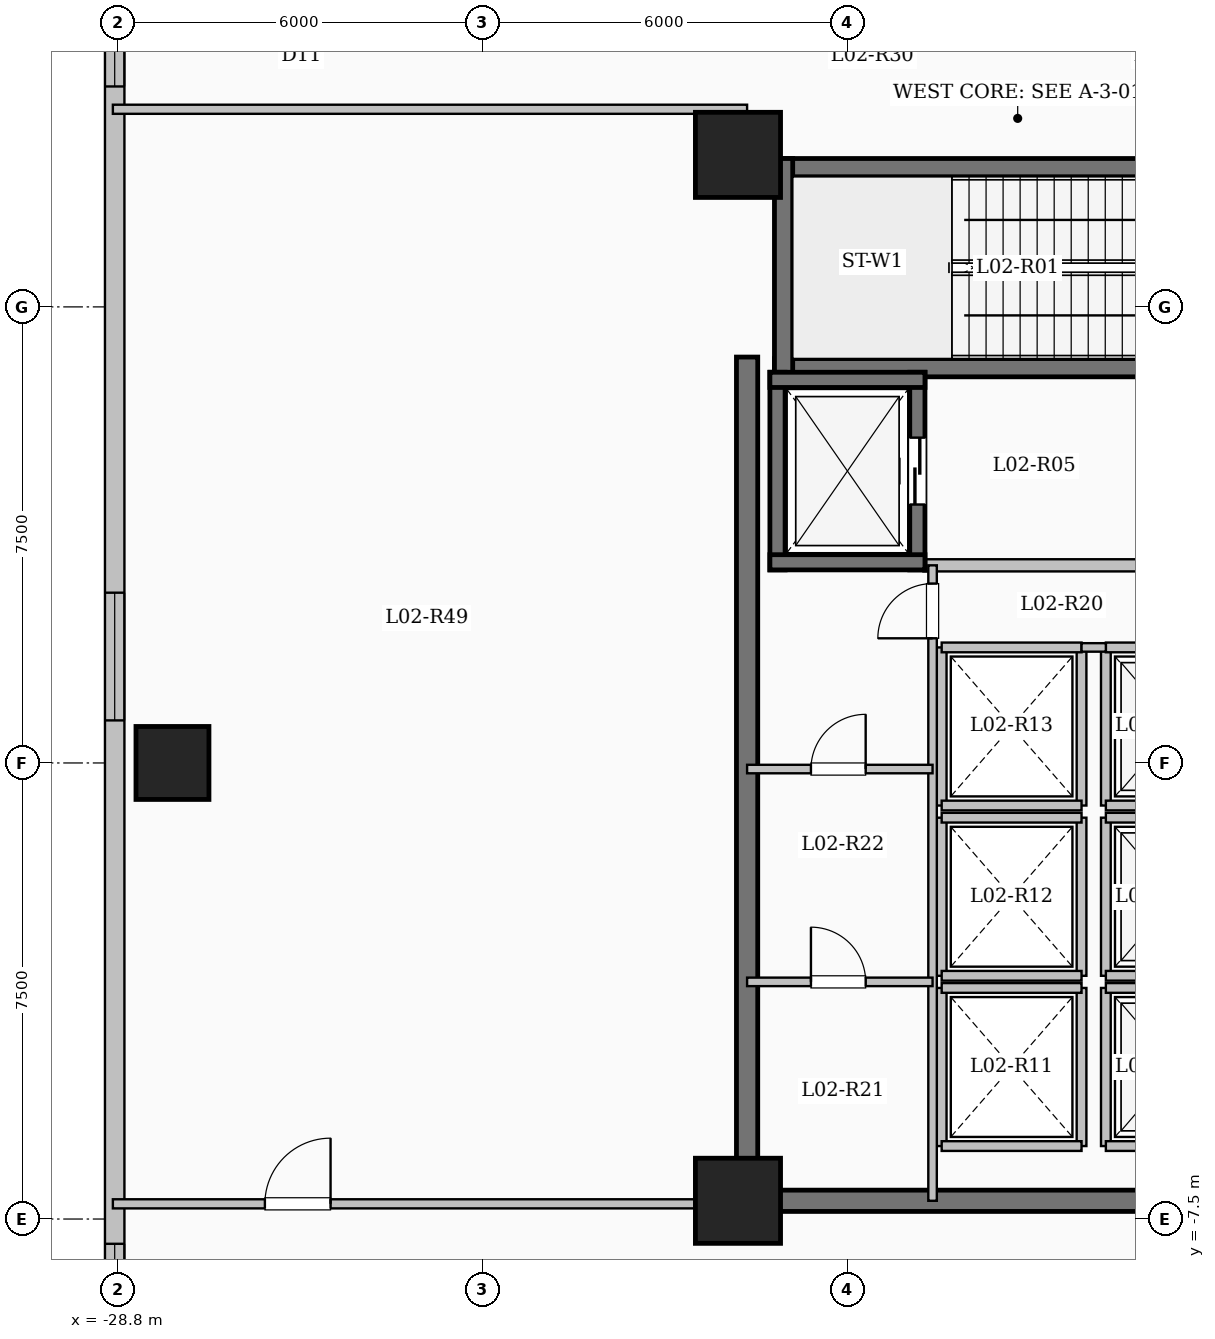
"""IFC4 building model, lengths in metres.
Left out: names, types, materials, properties, quantities, classifications, styles, units other than length and angle.
Written with IfcOpenShell. Run it as: python <this file> out.ifc"""

import sys

from ifc_helpers import new_model, si_unit, direction, frame, frame_2d, origin, origin_2d, place, context, subcontext, project, spatial, rectangle, extrude, element, fill, save


model = new_model("IFC4")
c1 = context("Model", 3, precision=1e-05, world=origin(), true_north=direction((0.0, 1.0)))
c2 = subcontext(c1, "Body", "Model", "MODEL_VIEW")
j1 = project(units=[si_unit("LENGTHUNIT", "METRE"), si_unit("PLANEANGLEUNIT", "RADIAN")], contexts=[c1])
p1 = place(None, origin())
s1 = spatial("IfcSite", under=j1, at=p1, CompositionType="ELEMENT")
p2 = place(p1, origin())
s2 = spatial("IfcBuilding", under=s1, at=p2, CompositionType="ELEMENT")
p3 = place(p2, frame((0.0, 0.0, 9.9)))
s3 = spatial("IfcBuildingStorey", under=s2, at=p3, CompositionType="ELEMENT", Elevation=9.9)
for number, where, z_axis, x_axis in (
    (1, (-18.6, -7.2, 0.0), (0.0, 0.0, 1.0), (1.0, 0.0, 0.0)),
    (2, (-18.6, 10.0, 0.0), (0.0, 0.0, 1.0), (1.0, 0.0, 0.0)),
):
    element("IfcColumn", number, at=place(p3, frame(where, z_axis=z_axis, x_axis=x_axis)), inside=s3, PredefinedType="COLUMN", context=c2, shape_type="SweptSolid", body=[
        extrude(rectangle(XDim=1.4, YDim=1.4, at=origin_2d()), origin(), (0.0, 0.0, 1.0), 4.5),
    ])
p4 = place(p3, frame((-27.9, 0.0, 0.0), z_axis=(0.0, 0.0, 1.0), x_axis=(1.0, 0.0, 0.0)))
e3 = element("IfcColumn", 3, at=p4, inside=s3, PredefinedType="COLUMN", context=c2, shape_type="SweptSolid", body=[
    extrude(rectangle(XDim=1.2, YDim=1.2, at=origin_2d()), origin(), (0.0, 0.0, 1.0), 4.5),
])
p5 = place(p3, frame((-28.85, -29.85, 0.0), z_axis=(0.0, 0.0, 1.0), x_axis=(0.0, 1.0, 0.0)))
e4 = element("IfcWall", 4, at=p5, inside=s3, PredefinedType="SOLIDWALL", context=c2, shape_type="SweptSolid", body=[
    extrude(rectangle(XDim=59.7, YDim=0.32, at=frame_2d((29.85, 0.0))), origin(), (0.0, 0.0, 1.0), 4.2),
])
p6 = place(p5, frame((8.65, 0.0, 0.9)))
e5 = element("IfcOpeningElement", 5, at=p6, cuts=e4, PredefinedType="OPENING", context=c2, shape_type="SweptSolid", body=[
    extrude(rectangle(XDim=2.1, YDim=2.0, at=frame_2d((1.05, 1.0))), frame((0.0, 0.17, 0.0), z_axis=(0.0, -1.0, 0.0), x_axis=(1.0, 0.0, 0.0)), (0.0, 0.0, 1.0), 0.34),
])
p7 = place(p5, frame((20.242, 0.0, 0.9)))
e6 = element("IfcOpeningElement", 6, at=p7, cuts=e4, PredefinedType="OPENING", context=c2, shape_type="SweptSolid", body=[
    extrude(rectangle(XDim=1.7, YDim=1.9, at=frame_2d((0.85, 0.95))), frame((0.0, 0.17, 0.0), z_axis=(0.0, -1.0, 0.0), x_axis=(1.0, 0.0, 0.0)), (0.0, 0.0, 1.0), 0.34),
])
p8 = place(p5, frame((30.55, 0.0, 0.9)))
e7 = element("IfcOpeningElement", 7, at=p8, cuts=e4, PredefinedType="OPENING", context=c2, shape_type="SweptSolid", body=[
    extrude(rectangle(XDim=2.1, YDim=2.0, at=frame_2d((1.05, 1.0))), frame((0.0, 0.17, 0.0), z_axis=(0.0, -1.0, 0.0), x_axis=(1.0, 0.0, 0.0)), (0.0, 0.0, 1.0), 0.34),
])
p9 = place(p5, frame((40.975, 0.0, 0.95)))
e8 = element("IfcOpeningElement", 8, at=p9, cuts=e4, PredefinedType="OPENING", context=c2, shape_type="SweptSolid", body=[
    extrude(rectangle(XDim=1.0, YDim=1.5, at=frame_2d((0.5, 0.75))), frame((0.0, 0.17, 0.0), z_axis=(0.0, -1.0, 0.0), x_axis=(1.0, 0.0, 0.0)), (0.0, 0.0, 1.0), 0.34),
])
p10 = place(p5, frame((50.0, 0.0, 0.9)))
e9 = element("IfcOpeningElement", 9, at=p10, cuts=e4, PredefinedType="OPENING", context=c2, shape_type="SweptSolid", body=[
    extrude(rectangle(XDim=2.1, YDim=2.0, at=frame_2d((1.05, 1.0))), frame((0.0, 0.17, 0.0), z_axis=(0.0, -1.0, 0.0), x_axis=(1.0, 0.0, 0.0)), (0.0, 0.0, 1.0), 0.34),
])
p11 = place(p3, frame((-18.0, 9.79, 0.0), z_axis=(0.0, 0.0, 1.0), x_axis=(1.0, 0.0, 0.0)))
e10 = element("IfcWall", 10, at=p11, inside=s3, PredefinedType="SHEAR", context=c2, shape_type="SweptSolid", body=[
    extrude(rectangle(XDim=8.0, YDim=0.3, at=frame_2d((4.0, 0.0))), origin(), (0.0, 0.0, 1.0), 4.5),
])
p12 = place(p3, frame((-18.0, 6.5, 0.0), z_axis=(0.0, 0.0, 1.0), x_axis=(1.0, 0.0, 0.0)))
e11 = element("IfcWall", 11, at=p12, inside=s3, PredefinedType="SHEAR", context=c2, shape_type="SweptSolid", body=[
    extrude(rectangle(XDim=8.0, YDim=0.3, at=frame_2d((4.0, 0.0))), origin(), (0.0, 0.0, 1.0), 4.5),
])
p13 = place(p12, frame((6.45, 0.0, 0.0)))
e12 = element("IfcOpeningElement", 12, at=p13, cuts=e11, PredefinedType="OPENING", context=c2, shape_type="SweptSolid", body=[
    extrude(rectangle(XDim=1.0, YDim=2.15, at=frame_2d((0.5, 1.075))), frame((0.0, 0.16, 0.0), z_axis=(0.0, -1.0, 0.0), x_axis=(1.0, 0.0, 0.0)), (0.0, 0.0, 1.0), 0.32),
])
p14 = place(p3, frame((-17.85, 6.35, 0.0), z_axis=(0.0, 0.0, 1.0), x_axis=(0.0, 1.0, 0.0)))
e13 = element("IfcWall", 13, at=p14, inside=s3, PredefinedType="SHEAR", context=c2, shape_type="SweptSolid", body=[
    extrude(rectangle(XDim=3.59, YDim=0.3, at=frame_2d((1.795, 0.0))), origin(), (0.0, 0.0, 1.0), 4.5),
])
p15 = place(p3, frame((-15.55, 3.25, 0.0), z_axis=(0.0, 0.0, 1.0), x_axis=(1.0, 0.0, 0.0)))
e14 = element("IfcWall", 14, at=p15, inside=s3, PredefinedType="SOLIDWALL", context=c2, shape_type="SweptSolid", body=[
    extrude(rectangle(XDim=5.4, YDim=0.2, at=frame_2d((2.7, 0.0))), origin(), (0.0, 0.0, 1.0), 4.2),
])
p16 = place(p3, frame((-17.95, 3.175, 0.0), z_axis=(0.0, 0.0, 1.0), x_axis=(0.0, 1.0, 0.0)))
e15 = element("IfcWall", 15, at=p16, inside=s3, PredefinedType="SHEAR", context=c2, shape_type="SweptSolid", body=[
    extrude(rectangle(XDim=3.25, YDim=0.25, at=frame_2d((1.625, 0.0))), origin(), (0.0, 0.0, 1.0), 4.5),
])
p17 = place(p3, frame((-15.65, 3.175, 0.0), z_axis=(0.0, 0.0, 1.0), x_axis=(0.0, 1.0, 0.0)))
e16 = element("IfcWall", 16, at=p17, inside=s3, PredefinedType="SHEAR", context=c2, shape_type="SweptSolid", body=[
    extrude(rectangle(XDim=3.25, YDim=0.25, at=frame_2d((1.625, 0.0))), origin(), (0.0, 0.0, 1.0), 4.5),
])
p18 = place(p17, frame((1.075, 0.0, 0.0)))
e17 = element("IfcOpeningElement", 17, at=p18, cuts=e16, PredefinedType="OPENING", context=c2, shape_type="SweptSolid", body=[
    extrude(rectangle(XDim=1.1, YDim=2.15, at=frame_2d((0.55, 1.075))), frame((0.0, 0.135, 0.0), z_axis=(0.0, -1.0, 0.0), x_axis=(1.0, 0.0, 0.0)), (0.0, 0.0, 1.0), 0.27),
])
for number, where, z_axis, x_axis in (
    (18, (-18.075, 3.3, 0.0), (0.0, 0.0, 1.0), (1.0, 0.0, 0.0)),
    (19, (-18.075, 6.3, 0.0), (0.0, 0.0, 1.0), (1.0, 0.0, 0.0)),
):
    element("IfcWall", number, at=place(p3, frame(where, z_axis=z_axis, x_axis=x_axis)), inside=s3, PredefinedType="SHEAR", context=c2, shape_type="SweptSolid", body=[
        extrude(rectangle(XDim=2.55, YDim=0.25, at=frame_2d((1.275, 0.0))), origin(), (0.0, 0.0, 1.0), 4.5),
    ])
p19 = place(p3, frame((-12.55, -6.3, 0.0), z_axis=(0.0, 0.0, 1.0), x_axis=(0.0, 1.0, 0.0)))
e20 = element("IfcWall", 20, at=p19, inside=s3, PredefinedType="SOLIDWALL", context=c2, shape_type="SweptSolid", body=[
    extrude(rectangle(XDim=2.6, YDim=0.16, at=frame_2d((1.3, 0.0))), origin(), (0.0, 0.0, 1.0), 4.2),
])
for number, where, z_axis, x_axis in (
    (21, (-12.55, -6.3, 0.0), (0.0, 0.0, 1.0), (1.0, 0.0, 0.0)),
    (22, (-12.55, -3.7, 0.0), (0.0, 0.0, 1.0), (1.0, 0.0, 0.0)),
):
    element("IfcWall", number, at=place(p3, frame(where, z_axis=z_axis, x_axis=x_axis)), inside=s3, PredefinedType="SOLIDWALL", context=c2, shape_type="SweptSolid", body=[
        extrude(rectangle(XDim=2.3, YDim=0.16, at=frame_2d((1.15, 0.0))), origin(), (0.0, 0.0, 1.0), 4.2),
    ])
p20 = place(p3, frame((-12.55, -3.5, 0.0), z_axis=(0.0, 0.0, 1.0), x_axis=(0.0, 1.0, 0.0)))
e23 = element("IfcWall", 23, at=p20, inside=s3, PredefinedType="SOLIDWALL", context=c2, shape_type="SweptSolid", body=[
    extrude(rectangle(XDim=2.6, YDim=0.16, at=frame_2d((1.3, 0.0))), origin(), (0.0, 0.0, 1.0), 4.2),
])
for number, where, z_axis, x_axis in (
    (24, (-12.55, -3.5, 0.0), (0.0, 0.0, 1.0), (1.0, 0.0, 0.0)),
    (25, (-12.55, -0.9, 0.0), (0.0, 0.0, 1.0), (1.0, 0.0, 0.0)),
):
    element("IfcWall", number, at=place(p3, frame(where, z_axis=z_axis, x_axis=x_axis)), inside=s3, PredefinedType="SOLIDWALL", context=c2, shape_type="SweptSolid", body=[
        extrude(rectangle(XDim=2.3, YDim=0.16, at=frame_2d((1.15, 0.0))), origin(), (0.0, 0.0, 1.0), 4.2),
    ])
p21 = place(p3, frame((-12.55, -0.7, 0.0), z_axis=(0.0, 0.0, 1.0), x_axis=(0.0, 1.0, 0.0)))
e26 = element("IfcWall", 26, at=p21, inside=s3, PredefinedType="SOLIDWALL", context=c2, shape_type="SweptSolid", body=[
    extrude(rectangle(XDim=2.6, YDim=0.16, at=frame_2d((1.3, 0.0))), origin(), (0.0, 0.0, 1.0), 4.2),
])
for number, where, z_axis, x_axis in (
    (27, (-12.55, -0.7, 0.0), (0.0, 0.0, 1.0), (1.0, 0.0, 0.0)),
    (28, (-12.55, 1.9, 0.0), (0.0, 0.0, 1.0), (1.0, 0.0, 0.0)),
):
    element("IfcWall", number, at=place(p3, frame(where, z_axis=z_axis, x_axis=x_axis)), inside=s3, PredefinedType="SOLIDWALL", context=c2, shape_type="SweptSolid", body=[
        extrude(rectangle(XDim=2.3, YDim=0.16, at=frame_2d((1.15, 0.0))), origin(), (0.0, 0.0, 1.0), 4.2),
    ])
for number, where, z_axis, x_axis in (
    (29, (-15.25, -6.3, 0.0), (0.0, 0.0, 1.0), (0.0, 1.0, 0.0)),
    (30, (-12.95, -6.3, 0.0), (0.0, 0.0, 1.0), (0.0, 1.0, 0.0)),
):
    element("IfcWall", number, at=place(p3, frame(where, z_axis=z_axis, x_axis=x_axis)), inside=s3, PredefinedType="SOLIDWALL", context=c2, shape_type="SweptSolid", body=[
        extrude(rectangle(XDim=2.6, YDim=0.16, at=frame_2d((1.3, 0.0))), origin(), (0.0, 0.0, 1.0), 4.2),
    ])
for number, where, z_axis, x_axis in (
    (31, (-15.25, -6.3, 0.0), (0.0, 0.0, 1.0), (1.0, 0.0, 0.0)),
    (32, (-15.25, -3.7, 0.0), (0.0, 0.0, 1.0), (1.0, 0.0, 0.0)),
):
    element("IfcWall", number, at=place(p3, frame(where, z_axis=z_axis, x_axis=x_axis)), inside=s3, PredefinedType="SOLIDWALL", context=c2, shape_type="SweptSolid", body=[
        extrude(rectangle(XDim=2.3, YDim=0.16, at=frame_2d((1.15, 0.0))), origin(), (0.0, 0.0, 1.0), 4.2),
    ])
for number, where, z_axis, x_axis in (
    (33, (-15.25, -3.5, 0.0), (0.0, 0.0, 1.0), (0.0, 1.0, 0.0)),
    (34, (-12.95, -3.5, 0.0), (0.0, 0.0, 1.0), (0.0, 1.0, 0.0)),
):
    element("IfcWall", number, at=place(p3, frame(where, z_axis=z_axis, x_axis=x_axis)), inside=s3, PredefinedType="SOLIDWALL", context=c2, shape_type="SweptSolid", body=[
        extrude(rectangle(XDim=2.6, YDim=0.16, at=frame_2d((1.3, 0.0))), origin(), (0.0, 0.0, 1.0), 4.2),
    ])
for number, where, z_axis, x_axis in (
    (35, (-15.25, -3.5, 0.0), (0.0, 0.0, 1.0), (1.0, 0.0, 0.0)),
    (36, (-15.25, -0.9, 0.0), (0.0, 0.0, 1.0), (1.0, 0.0, 0.0)),
):
    element("IfcWall", number, at=place(p3, frame(where, z_axis=z_axis, x_axis=x_axis)), inside=s3, PredefinedType="SOLIDWALL", context=c2, shape_type="SweptSolid", body=[
        extrude(rectangle(XDim=2.3, YDim=0.16, at=frame_2d((1.15, 0.0))), origin(), (0.0, 0.0, 1.0), 4.2),
    ])
for number, where, z_axis, x_axis in (
    (37, (-15.25, -0.7, 0.0), (0.0, 0.0, 1.0), (0.0, 1.0, 0.0)),
    (38, (-12.95, -0.7, 0.0), (0.0, 0.0, 1.0), (0.0, 1.0, 0.0)),
):
    element("IfcWall", number, at=place(p3, frame(where, z_axis=z_axis, x_axis=x_axis)), inside=s3, PredefinedType="SOLIDWALL", context=c2, shape_type="SweptSolid", body=[
        extrude(rectangle(XDim=2.6, YDim=0.16, at=frame_2d((1.3, 0.0))), origin(), (0.0, 0.0, 1.0), 4.2),
    ])
for number, where, z_axis, x_axis in (
    (39, (-15.25, -0.7, 0.0), (0.0, 0.0, 1.0), (1.0, 0.0, 0.0)),
    (40, (-15.25, 1.9, 0.0), (0.0, 0.0, 1.0), (1.0, 0.0, 0.0)),
):
    element("IfcWall", number, at=place(p3, frame(where, z_axis=z_axis, x_axis=x_axis)), inside=s3, PredefinedType="SOLIDWALL", context=c2, shape_type="SweptSolid", body=[
        extrude(rectangle(XDim=2.3, YDim=0.16, at=frame_2d((1.15, 0.0))), origin(), (0.0, 0.0, 1.0), 4.2),
    ])
p22 = place(p3, frame((-18.45, -7.375, 0.0), z_axis=(0.0, 0.0, 1.0), x_axis=(0.0, 1.0, 0.0)))
e41 = element("IfcWall", 41, at=p22, inside=s3, PredefinedType="SHEAR", context=c2, shape_type="SweptSolid", body=[
    extrude(rectangle(XDim=14.05, YDim=0.35, at=frame_2d((7.025, 0.0))), origin(), (0.0, 0.0, 1.0), 4.5),
])
p23 = place(p3, frame((-18.625, -7.2, 0.0), z_axis=(0.0, 0.0, 1.0), x_axis=(1.0, 0.0, 0.0)))
e42 = element("IfcWall", 42, at=p23, inside=s3, PredefinedType="SHEAR", context=c2, shape_type="SweptSolid", body=[
    extrude(rectangle(XDim=8.55, YDim=0.35, at=frame_2d((4.275, 0.0))), origin(), (0.0, 0.0, 1.0), 4.5),
])
p24 = place(p3, frame((-12.95, 1.9, 0.0), z_axis=(0.0, 0.0, 1.0), x_axis=(1.0, 0.0, 0.0)))
e43 = element("IfcWall", 43, at=p24, inside=s3, PredefinedType="PARTITIONING", context=c2, shape_type="SweptSolid", body=[
    extrude(rectangle(XDim=0.4, YDim=0.14, at=frame_2d((0.2, 0.0))), origin(), (0.0, 0.0, 1.0), 4.2),
])
p25 = place(p3, frame((-15.4, -7.2, 0.0), z_axis=(0.0, 0.0, 1.0), x_axis=(0.0, 1.0, 0.0)))
e44 = element("IfcWall", 44, at=p25, inside=s3, PredefinedType="PARTITIONING", context=c2, shape_type="SweptSolid", body=[
    extrude(rectangle(XDim=10.45, YDim=0.14, at=frame_2d((5.225, 0.0))), origin(), (0.0, 0.0, 1.0), 4.2),
])
p26 = place(p25, frame((9.25, 0.0, 0.0)))
e45 = element("IfcOpeningElement", 45, at=p26, cuts=e44, PredefinedType="OPENING", context=c2, shape_type="SweptSolid", body=[
    extrude(rectangle(XDim=0.9, YDim=2.08, at=frame_2d((0.45, 1.04))), frame((0.0, 0.08, 0.0), z_axis=(0.0, -1.0, 0.0), x_axis=(1.0, 0.0, 0.0)), (0.0, 0.0, 1.0), 0.16),
])
p27 = place(p3, frame((-18.45, -3.6, 0.0), z_axis=(0.0, 0.0, 1.0), x_axis=(1.0, 0.0, 0.0)))
e46 = element("IfcWall", 46, at=p27, inside=s3, PredefinedType="PARTITIONING", context=c2, shape_type="SweptSolid", body=[
    extrude(rectangle(XDim=3.05, YDim=0.14, at=frame_2d((1.525, 0.0))), origin(), (0.0, 0.0, 1.0), 4.2),
])
p28 = place(p27, frame((1.05, 0.0, 0.0)))
e47 = element("IfcOpeningElement", 47, at=p28, cuts=e46, PredefinedType="OPENING", context=c2, shape_type="SweptSolid", body=[
    extrude(rectangle(XDim=0.9, YDim=2.08, at=frame_2d((0.45, 1.04))), frame((0.0, 0.08, 0.0), z_axis=(0.0, -1.0, 0.0), x_axis=(1.0, 0.0, 0.0)), (0.0, 0.0, 1.0), 0.16),
])
p29 = place(p3, frame((-18.45, -0.1, 0.0), z_axis=(0.0, 0.0, 1.0), x_axis=(1.0, 0.0, 0.0)))
e48 = element("IfcWall", 48, at=p29, inside=s3, PredefinedType="PARTITIONING", context=c2, shape_type="SweptSolid", body=[
    extrude(rectangle(XDim=3.05, YDim=0.14, at=frame_2d((1.525, 0.0))), origin(), (0.0, 0.0, 1.0), 4.2),
])
p30 = place(p29, frame((1.05, 0.0, 0.0)))
e49 = element("IfcOpeningElement", 49, at=p30, cuts=e48, PredefinedType="OPENING", context=c2, shape_type="SweptSolid", body=[
    extrude(rectangle(XDim=0.9, YDim=2.08, at=frame_2d((0.45, 1.04))), frame((0.0, 0.08, 0.0), z_axis=(0.0, -1.0, 0.0), x_axis=(1.0, 0.0, 0.0)), (0.0, 0.0, 1.0), 0.16),
])
p31 = place(p3, frame((-28.88, -7.25, 0.0), z_axis=(0.0, 0.0, 1.0), x_axis=(1.0, 0.0, 0.0)))
e50 = element("IfcWall", 50, at=p31, inside=s3, PredefinedType="PARTITIONING", context=c2, shape_type="SweptSolid", body=[
    extrude(rectangle(XDim=10.43, YDim=0.15, at=frame_2d((5.215, 0.0))), origin(), (0.0, 0.0, 1.0), 4.2),
])
p32 = place(p31, frame((2.5, 0.0, 0.0)))
e51 = element("IfcOpeningElement", 51, at=p32, cuts=e50, PredefinedType="OPENING", context=c2, shape_type="SweptSolid", body=[
    extrude(rectangle(XDim=1.08, YDim=2.15, at=frame_2d((0.54, 1.075))), frame((0.0, 0.085, 0.0), z_axis=(0.0, -1.0, 0.0), x_axis=(1.0, 0.0, 0.0)), (0.0, 0.0, 1.0), 0.17),
])
p33 = place(p3, frame((-28.88, 10.75, 0.0), z_axis=(0.0, 0.0, 1.0), x_axis=(1.0, 0.0, 0.0)))
e52 = element("IfcWall", 52, at=p33, inside=s3, PredefinedType="PARTITIONING", context=c2, shape_type="SweptSolid", body=[
    extrude(rectangle(XDim=10.43, YDim=0.15, at=frame_2d((5.215, 0.0))), origin(), (0.0, 0.0, 1.0), 4.2),
])
p34 = place(p7, origin())
e53 = element("IfcWindow", 53, at=p34, inside=s3, PartitioningType="SINGLE_PANEL", PredefinedType="WINDOW", context=c2, shape_type="SweptSolid", body=[
    extrude(rectangle(XDim=1.7, YDim=1.9, at=frame_2d((0.85, 0.95))), frame((0.0, 0.03, 0.0), z_axis=(0.0, -1.0, 0.0), x_axis=(1.0, 0.0, 0.0)), (0.0, 0.0, 1.0), 0.06),
])
fill(e6, e53)
p35 = place(p8, origin())
e54 = element("IfcWindow", 54, at=p35, inside=s3, PartitioningType="SINGLE_PANEL", PredefinedType="WINDOW", context=c2, shape_type="SweptSolid", body=[
    extrude(rectangle(XDim=2.1, YDim=2.0, at=frame_2d((1.05, 1.0))), frame((0.0, 0.03, 0.0), z_axis=(0.0, -1.0, 0.0), x_axis=(1.0, 0.0, 0.0)), (0.0, 0.0, 1.0), 0.06),
])
fill(e7, e54)
p36 = place(p9, origin())
e55 = element("IfcWindow", 55, at=p36, inside=s3, PartitioningType="SINGLE_PANEL", PredefinedType="WINDOW", context=c2, shape_type="SweptSolid", body=[
    extrude(rectangle(XDim=1.0, YDim=1.5, at=frame_2d((0.5, 0.75))), frame((0.0, 0.03, 0.0), z_axis=(0.0, -1.0, 0.0), x_axis=(1.0, 0.0, 0.0)), (0.0, 0.0, 1.0), 0.06),
])
fill(e8, e55)
p37 = place(p18, origin())
e56 = element("IfcDoor", 56, at=p37, inside=s3, OperationType="SLIDING_TO_LEFT", PredefinedType="DOOR", context=c2, shape_type="SweptSolid", body=[
    extrude(rectangle(XDim=1.1, YDim=2.15, at=frame_2d((0.55, 1.075))), frame((0.0, 0.025, 0.0), z_axis=(0.0, -1.0, 0.0), x_axis=(1.0, 0.0, 0.0)), (0.0, 0.0, 1.0), 0.05),
])
fill(e17, e56)
p38 = place(p26, origin())
e57 = element("IfcDoor", 57, at=p38, inside=s3, OperationType="SINGLE_SWING_LEFT", PredefinedType="DOOR", context=c2, shape_type="SweptSolid", body=[
    extrude(rectangle(XDim=0.9, YDim=2.08, at=frame_2d((0.45, 1.04))), frame((0.0, 0.025, 0.0), z_axis=(0.0, -1.0, 0.0), x_axis=(1.0, 0.0, 0.0)), (0.0, 0.0, 1.0), 0.05),
])
fill(e45, e57)
p39 = place(p30, origin())
e58 = element("IfcDoor", 58, at=p39, inside=s3, OperationType="SINGLE_SWING_RIGHT", PredefinedType="DOOR", context=c2, shape_type="SweptSolid", body=[
    extrude(rectangle(XDim=0.9, YDim=2.08, at=frame_2d((0.45, 1.04))), frame((0.0, 0.025, 0.0), z_axis=(0.0, -1.0, 0.0), x_axis=(1.0, 0.0, 0.0)), (0.0, 0.0, 1.0), 0.05),
])
fill(e49, e58)
p40 = place(p28, origin())
e59 = element("IfcDoor", 59, at=p40, inside=s3, OperationType="SINGLE_SWING_LEFT", PredefinedType="DOOR", context=c2, shape_type="SweptSolid", body=[
    extrude(rectangle(XDim=0.9, YDim=2.08, at=frame_2d((0.45, 1.04))), frame((0.0, 0.025, 0.0), z_axis=(0.0, -1.0, 0.0), x_axis=(1.0, 0.0, 0.0)), (0.0, 0.0, 1.0), 0.05),
])
fill(e47, e59)
p41 = place(p32, origin())
e60 = element("IfcDoor", 60, at=p41, inside=s3, OperationType="SINGLE_SWING_RIGHT", PredefinedType="DOOR", context=c2, shape_type="SweptSolid", body=[
    extrude(rectangle(XDim=1.08, YDim=2.15, at=frame_2d((0.54, 1.075))), frame((0.0, 0.025, 0.0), z_axis=(0.0, -1.0, 0.0), x_axis=(1.0, 0.0, 0.0)), (0.0, 0.0, 1.0), 0.05),
])
fill(e51, e60)
save(model, sys.argv[1])
